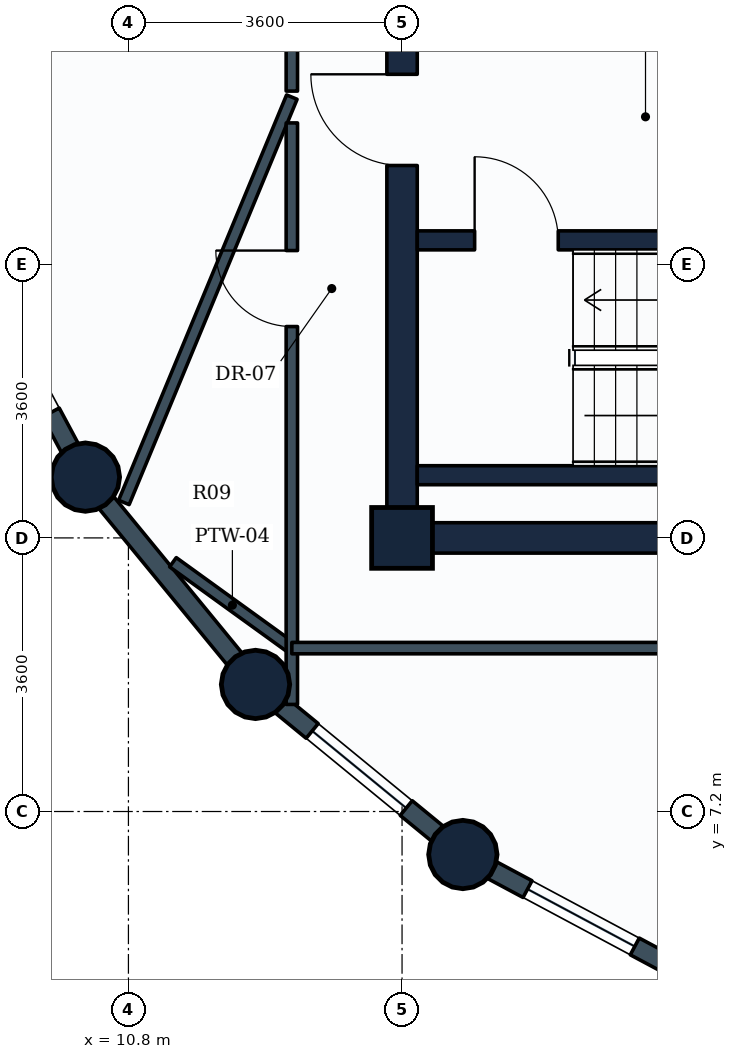
"""IFC4 building model, lengths in metres.
Left out: names, types, materials, properties, quantities, classifications, styles, units other than length and angle.
Written with IfcOpenShell. Run it as: python <this file> out.ifc"""

import sys

from ifc_helpers import new_model, si_unit, direction, frame, frame_2d, origin, origin_2d, place, context, subcontext, project, spatial, rectangle, circle, extrude, element, fill, save


model = new_model("IFC4")
c1 = context("Model", 3, precision=1e-05, world=origin(), true_north=direction((0.0, 1.0)))
c2 = subcontext(c1, "Body", "Model", "MODEL_VIEW")
j1 = project(units=[si_unit("LENGTHUNIT", "METRE"), si_unit("PLANEANGLEUNIT", "RADIAN")], contexts=[c1])
p1 = place(None, origin())
s1 = spatial("IfcSite", under=j1, at=p1, CompositionType="ELEMENT")
p2 = place(p1, origin())
s2 = spatial("IfcBuilding", under=s1, at=p2, CompositionType="ELEMENT")
p3 = place(p2, frame((0.0, 0.0, 266.6)))
s3 = spatial("IfcBuildingStorey", under=s2, at=p3, CompositionType="ELEMENT", Elevation=266.6)
for number, where, z_axis, x_axis in (
    (1, (10.234, 11.6, 0.0), (0.0, 0.0, 1.0), (1.0, 0.0, 0.0)),
    (2, (12.472, 8.872, 0.0), (0.0, 0.0, 1.0), (1.0, 0.0, 0.0)),
):
    element("IfcColumn", number, at=place(p3, frame(where, z_axis=z_axis, x_axis=x_axis)), inside=s3, PredefinedType="COLUMN", context=c2, shape_type="SweptSolid", body=[
        extrude(circle(Radius=0.45, at=origin_2d()), origin(), (0.0, 0.0, 1.0), 3.6),
    ])
p4 = place(p3, frame((14.4, 10.8, 0.0), z_axis=(0.0, 0.0, 1.0), x_axis=(1.0, 0.0, 0.0)))
e3 = element("IfcColumn", 3, at=p4, inside=s3, PredefinedType="COLUMN", context=c2, shape_type="SweptSolid", body=[
    extrude(rectangle(XDim=0.8, YDim=0.8, at=origin_2d()), origin(), (0.0, 0.0, 1.0), 3.6),
])
p5 = place(p3, frame((15.2, 6.634, 0.0), z_axis=(0.0, 0.0, 1.0), x_axis=(1.0, 0.0, 0.0)))
e4 = element("IfcColumn", 4, at=p5, inside=s3, PredefinedType="COLUMN", context=c2, shape_type="SweptSolid", body=[
    extrude(circle(Radius=0.45, at=origin_2d()), origin(), (0.0, 0.0, 1.0), 3.6),
])
p6 = place(p3, frame((10.234, 11.6, 0.0), z_axis=(0.0, 0.0, 1.0), x_axis=(-0.47151087309, 0.881860247748, 0.0)))
e5 = element("IfcWall", 5, at=p6, inside=s3, PredefinedType="STANDARD", context=c2, shape_type="SweptSolid", body=[
    extrude(rectangle(XDim=3.529, YDim=0.25, at=frame_2d((1.764, 0.0))), origin(), (0.0, 0.0, 1.0), 2.83),
])
p7 = place(p6, frame((0.964, 0.0, 0.85)))
e6 = element("IfcOpeningElement", 6, at=p7, cuts=e5, PredefinedType="OPENING", context=c2, shape_type="SweptSolid", body=[
    extrude(rectangle(XDim=1.6, YDim=1.35, at=frame_2d((0.8, 0.675))), frame((0.0, 0.135, 0.0), z_axis=(0.0, -1.0, 0.0), x_axis=(1.0, 0.0, 0.0)), (0.0, 0.0, 1.0), 0.27),
])
p8 = place(p3, frame((12.472, 8.872, 0.0), z_axis=(0.0, 0.0, 1.0), x_axis=(-0.634258295121, 0.773121216285, 0.0)))
e7 = element("IfcWall", 7, at=p8, inside=s3, PredefinedType="STANDARD", context=c2, shape_type="SweptSolid", body=[
    extrude(rectangle(XDim=3.529, YDim=0.25, at=frame_2d((1.764, 0.0))), origin(), (0.0, 0.0, 1.0), 2.83),
])
p9 = place(p3, frame((15.2, 6.634, 0.0), z_axis=(0.0, 0.0, 1.0), x_axis=(-0.773121216285, 0.634258295121, 0.0)))
e8 = element("IfcWall", 8, at=p9, inside=s3, PredefinedType="STANDARD", context=c2, shape_type="SweptSolid", body=[
    extrude(rectangle(XDim=3.529, YDim=0.25, at=frame_2d((1.764, 0.0))), origin(), (0.0, 0.0, 1.0), 2.83),
])
p10 = place(p9, frame((0.964, 0.0, 0.85)))
e9 = element("IfcOpeningElement", 9, at=p10, cuts=e8, PredefinedType="OPENING", context=c2, shape_type="SweptSolid", body=[
    extrude(rectangle(XDim=1.6, YDim=1.35, at=frame_2d((0.8, 0.675))), frame((0.0, 0.135, 0.0), z_axis=(0.0, -1.0, 0.0), x_axis=(1.0, 0.0, 0.0)), (0.0, 0.0, 1.0), 0.27),
])
p11 = place(p3, frame((18.312, 4.97, 0.0), z_axis=(0.0, 0.0, 1.0), x_axis=(-0.881846862014, 0.471535907389, 0.0)))
e10 = element("IfcWall", 10, at=p11, inside=s3, PredefinedType="STANDARD", context=c2, shape_type="SweptSolid", body=[
    extrude(rectangle(XDim=3.529, YDim=0.25, at=frame_2d((1.765, 0.0))), origin(), (0.0, 0.0, 1.0), 2.83),
])
p12 = place(p11, frame((0.964, 0.0, 0.85)))
e11 = element("IfcOpeningElement", 11, at=p12, cuts=e10, PredefinedType="OPENING", context=c2, shape_type="SweptSolid", body=[
    extrude(rectangle(XDim=1.6, YDim=1.35, at=frame_2d((0.8, 0.675))), frame((0.0, 0.135, 0.0), z_axis=(0.0, -1.0, 0.0), x_axis=(1.0, 0.0, 0.0)), (0.0, 0.0, 1.0), 0.27),
])
p13 = place(p3, frame((14.4, 10.8, 0.0), z_axis=(0.0, 0.0, 1.0), x_axis=(1.0, 0.0, 0.0)))
e12 = element("IfcWall", 12, at=p13, inside=s3, PredefinedType="SHEAR", context=c2, shape_type="SweptSolid", body=[
    extrude(rectangle(XDim=18.0, YDim=0.4, at=frame_2d((9.0, 0.0))), origin(), (0.0, 0.0, 1.0), 3.35),
])
p14 = place(p3, frame((14.4, 10.8, 0.0), z_axis=(0.0, 0.0, 1.0), x_axis=(0.0, 1.0, 0.0)))
e13 = element("IfcWall", 13, at=p14, inside=s3, PredefinedType="SHEAR", context=c2, shape_type="SweptSolid", body=[
    extrude(rectangle(XDim=14.4, YDim=0.4, at=frame_2d((7.2, 0.0))), origin(), (0.0, 0.0, 1.0), 3.35),
])
p15 = place(p14, frame((11.05, 0.0, 0.0)))
e14 = element("IfcOpeningElement", 14, at=p15, cuts=e13, PredefinedType="OPENING", context=c2, shape_type="SweptSolid", body=[
    extrude(rectangle(XDim=1.1, YDim=2.1, at=frame_2d((0.55, 1.05))), frame((0.0, 0.21, 0.0), z_axis=(0.0, -1.0, 0.0), x_axis=(1.0, 0.0, 0.0)), (0.0, 0.0, 1.0), 0.42),
])
p16 = place(p14, frame((4.9, 0.0, 0.0)))
e15 = element("IfcOpeningElement", 15, at=p16, cuts=e13, PredefinedType="OPENING", context=c2, shape_type="SweptSolid", body=[
    extrude(rectangle(XDim=1.2, YDim=2.1, at=frame_2d((0.6, 1.05))), frame((0.0, 0.21, 0.0), z_axis=(0.0, -1.0, 0.0), x_axis=(1.0, 0.0, 0.0)), (0.0, 0.0, 1.0), 0.42),
])
p17 = place(p14, frame((8.15, 0.0, 0.0)))
e16 = element("IfcOpeningElement", 16, at=p17, cuts=e13, PredefinedType="OPENING", context=c2, shape_type="SweptSolid", body=[
    extrude(rectangle(XDim=0.9, YDim=2.1, at=frame_2d((0.45, 1.05))), frame((0.0, 0.21, 0.0), z_axis=(0.0, -1.0, 0.0), x_axis=(1.0, 0.0, 0.0)), (0.0, 0.0, 1.0), 0.42),
])
p18 = place(p3, frame((14.6, 11.625, 0.0), z_axis=(0.0, 0.0, 1.0), x_axis=(1.0, 0.0, 0.0)))
e17 = element("IfcWall", 17, at=p18, inside=s3, PredefinedType="SHEAR", context=c2, shape_type="SweptSolid", body=[
    extrude(rectangle(XDim=8.75, YDim=0.25, at=frame_2d((4.375, 0.0))), origin(), (0.0, 0.0, 1.0), 3.35),
])
p19 = place(p3, frame((14.6, 14.715, 0.0), z_axis=(0.0, 0.0, 1.0), x_axis=(1.0, 0.0, 0.0)))
e18 = element("IfcWall", 18, at=p19, inside=s3, PredefinedType="SHEAR", context=c2, shape_type="SweptSolid", body=[
    extrude(rectangle(XDim=8.75, YDim=0.25, at=frame_2d((4.375, 0.0))), origin(), (0.0, 0.0, 1.0), 3.35),
])
p20 = place(p19, frame((0.755, 0.0, 0.0)))
e19 = element("IfcOpeningElement", 19, at=p20, cuts=e18, PredefinedType="OPENING", context=c2, shape_type="SweptSolid", body=[
    extrude(rectangle(XDim=1.1, YDim=2.1, at=frame_2d((0.55, 1.05))), frame((0.0, 0.135, 0.0), z_axis=(0.0, -1.0, 0.0), x_axis=(1.0, 0.0, 0.0)), (0.0, 0.0, 1.0), 0.27),
])
p21 = place(p3, frame((12.95, 9.35, 0.0), z_axis=(0.0, 0.0, 1.0), x_axis=(-0.8106792284, 0.585490553844, 0.0)))
e20 = element("IfcWall", 20, at=p21, inside=s3, PredefinedType="PARTITIONING", context=c2, shape_type="SweptSolid", body=[
    extrude(rectangle(XDim=1.93, YDim=0.15, at=frame_2d((0.965, 0.0))), origin(), (0.0, 0.0, 1.0), 2.83),
])
p22 = place(p3, frame((12.95, 16.6, 0.0), z_axis=(0.0, 0.0, 1.0), x_axis=(-0.382758890427, -0.923848273148, 0.0)))
e21 = element("IfcWall", 21, at=p22, inside=s3, PredefinedType="PARTITIONING", context=c2, shape_type="SweptSolid", body=[
    extrude(rectangle(XDim=5.773, YDim=0.15, at=frame_2d((2.887, 0.0))), origin(), (0.0, 0.0, 1.0), 2.83),
])
p23 = place(p3, frame((12.95, 16.679, 0.0), z_axis=(0.0, 0.0, 1.0), x_axis=(0.0, 1.0, 0.0)))
e22 = element("IfcWall", 22, at=p23, inside=s3, PredefinedType="PARTITIONING", context=c2, shape_type="SweptSolid", body=[
    extrude(rectangle(XDim=8.442, YDim=0.15, at=frame_2d((4.221, 0.0))), origin(), (0.0, 0.0, 1.0), 3.02),
])
p24 = place(p23, frame((3.721, 0.0, 0.0)))
e23 = element("IfcOpeningElement", 23, at=p24, cuts=e22, PredefinedType="OPENING", context=c2, shape_type="SweptSolid", body=[
    extrude(rectangle(XDim=1.0, YDim=2.1, at=frame_2d((0.5, 1.05))), frame((0.0, 0.085, 0.0), z_axis=(0.0, -1.0, 0.0), x_axis=(1.0, 0.0, 0.0)), (0.0, 0.0, 1.0), 0.17),
])
p25 = place(p3, frame((12.95, 8.609, 0.0), z_axis=(0.0, 0.0, 1.0), x_axis=(0.0, 1.0, 0.0)))
e24 = element("IfcWall", 24, at=p25, inside=s3, PredefinedType="PARTITIONING", context=c2, shape_type="SweptSolid", body=[
    extrude(rectangle(XDim=7.652, YDim=0.15, at=frame_2d((3.826, 0.0))), origin(), (0.0, 0.0, 1.0), 2.83),
])
p26 = place(p25, frame((4.972, 0.0, 0.0)))
e25 = element("IfcOpeningElement", 25, at=p26, cuts=e24, PredefinedType="OPENING", context=c2, shape_type="SweptSolid", body=[
    extrude(rectangle(XDim=1.0, YDim=2.1, at=frame_2d((0.5, 1.05))), frame((0.0, 0.085, 0.0), z_axis=(0.0, -1.0, 0.0), x_axis=(1.0, 0.0, 0.0)), (0.0, 0.0, 1.0), 0.17),
])
p27 = place(p3, frame((12.95, 9.35, 0.0), z_axis=(0.0, 0.0, 1.0), x_axis=(1.0, 0.0, 0.0)))
e26 = element("IfcWall", 26, at=p27, inside=s3, PredefinedType="PARTITIONING", context=c2, shape_type="SweptSolid", body=[
    extrude(rectangle(XDim=15.771, YDim=0.15, at=frame_2d((7.885, 0.0))), origin(), (0.0, 0.0, 1.0), 3.02),
])
p28 = place(p27, frame((4.836, 0.0, 0.0)))
e27 = element("IfcOpeningElement", 27, at=p28, cuts=e26, PredefinedType="OPENING", context=c2, shape_type="SweptSolid", body=[
    extrude(rectangle(XDim=1.0, YDim=2.1, at=frame_2d((0.5, 1.05))), frame((0.0, 0.085, 0.0), z_axis=(0.0, -1.0, 0.0), x_axis=(1.0, 0.0, 0.0)), (0.0, 0.0, 1.0), 0.17),
])
p29 = place(p7, origin())
e28 = element("IfcWindow", 28, at=p29, inside=s3, PartitioningType="SINGLE_PANEL", PredefinedType="WINDOW", context=c2, shape_type="SweptSolid", body=[
    extrude(rectangle(XDim=1.6, YDim=1.35, at=frame_2d((0.8, 0.675))), frame((0.0, 0.03, 0.0), z_axis=(0.0, -1.0, 0.0), x_axis=(1.0, 0.0, 0.0)), (0.0, 0.0, 1.0), 0.06),
])
fill(e6, e28)
p30 = place(p10, origin())
e29 = element("IfcWindow", 29, at=p30, inside=s3, PartitioningType="SINGLE_PANEL", PredefinedType="WINDOW", context=c2, shape_type="SweptSolid", body=[
    extrude(rectangle(XDim=1.6, YDim=1.35, at=frame_2d((0.8, 0.675))), frame((0.0, 0.03, 0.0), z_axis=(0.0, -1.0, 0.0), x_axis=(1.0, 0.0, 0.0)), (0.0, 0.0, 1.0), 0.06),
])
fill(e9, e29)
p31 = place(p12, origin())
e30 = element("IfcWindow", 30, at=p31, inside=s3, PartitioningType="SINGLE_PANEL", PredefinedType="WINDOW", context=c2, shape_type="SweptSolid", body=[
    extrude(rectangle(XDim=1.6, YDim=1.35, at=frame_2d((0.8, 0.675))), frame((0.0, 0.03, 0.0), z_axis=(0.0, -1.0, 0.0), x_axis=(1.0, 0.0, 0.0)), (0.0, 0.0, 1.0), 0.06),
])
fill(e11, e30)
p32 = place(p20, origin())
e31 = element("IfcDoor", 31, at=p32, inside=s3, OperationType="SINGLE_SWING_LEFT", PredefinedType="DOOR", context=c2, shape_type="SweptSolid", body=[
    extrude(rectangle(XDim=1.1, YDim=2.1, at=frame_2d((0.55, 1.05))), frame((0.0, 0.025, 0.0), z_axis=(0.0, -1.0, 0.0), x_axis=(1.0, 0.0, 0.0)), (0.0, 0.0, 1.0), 0.05),
])
fill(e19, e31)
p33 = place(p16, origin())
e32 = element("IfcDoor", 32, at=p33, inside=s3, OperationType="SINGLE_SWING_RIGHT", PredefinedType="DOOR", context=c2, shape_type="SweptSolid", body=[
    extrude(rectangle(XDim=1.2, YDim=2.1, at=frame_2d((0.6, 1.05))), frame((0.0, 0.025, 0.0), z_axis=(0.0, -1.0, 0.0), x_axis=(1.0, 0.0, 0.0)), (0.0, 0.0, 1.0), 0.05),
])
fill(e15, e32)
p34 = place(p26, origin())
e33 = element("IfcDoor", 33, at=p34, inside=s3, OperationType="SINGLE_SWING_RIGHT", PredefinedType="DOOR", context=c2, shape_type="SweptSolid", body=[
    extrude(rectangle(XDim=1.0, YDim=2.1, at=frame_2d((0.5, 1.05))), frame((0.0, 0.025, 0.0), z_axis=(0.0, -1.0, 0.0), x_axis=(1.0, 0.0, 0.0)), (0.0, 0.0, 1.0), 0.05),
])
fill(e25, e33)
save(model, sys.argv[1])
